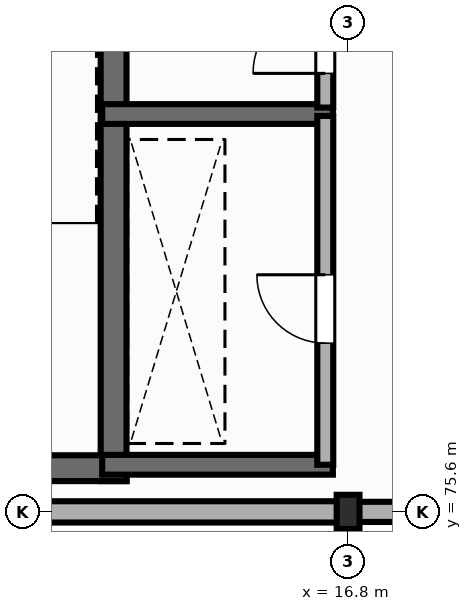
"""IFC4 building model, lengths in metres.
Left out: names, types, materials, properties, quantities, classifications, styles, units other than length and angle.
Written with IfcOpenShell. Run it as: python <this file> out.ifc"""

import sys

from ifc_helpers import new_model, si_unit, direction, frame, frame_2d, origin, origin_2d, place, context, subcontext, project, spatial, rectangle, i_section, extrude, element, fill, save


model = new_model("IFC4")
c1 = context("Model", 3, precision=1e-05, world=origin(), true_north=direction((0.0, 1.0)))
c2 = subcontext(c1, "Body", "Model", "MODEL_VIEW")
j1 = project(units=[si_unit("LENGTHUNIT", "METRE"), si_unit("PLANEANGLEUNIT", "RADIAN")], contexts=[c1])
p1 = place(None, origin())
s1 = spatial("IfcSite", under=j1, at=p1, CompositionType="ELEMENT")
p2 = place(p1, origin())
s2 = spatial("IfcBuilding", under=s1, at=p2, CompositionType="ELEMENT")
p3 = place(p2, frame((0.0, 0.0, 5.4)))
s3 = spatial("IfcBuildingStorey", under=s2, at=p3, CompositionType="ELEMENT", Elevation=5.4)
p4 = place(p3, frame((16.8, 75.6, 0.0), z_axis=(0.0, 0.0, 1.0), x_axis=(1.0, 0.0, 0.0)))
e1 = element("IfcColumn", 1, at=p4, inside=s3, PredefinedType="COLUMN", context=c2, shape_type="SweptSolid", body=[
    extrude(i_section(OverallWidth=0.3, OverallDepth=0.45, WebThickness=0.014, FlangeThickness=0.026, FilletRadius=0.027, at=origin_2d()), origin(), (0.0, 0.0, 1.0), 4.5),
])
p5 = place(p3, frame((8.408, 75.6, 0.0), z_axis=(0.0, 0.0, 1.0), x_axis=(1.0, 0.0, 0.0)))
e2 = element("IfcWall", 2, at=p5, inside=s3, PredefinedType="STANDARD", context=c2, shape_type="SweptSolid", body=[
    extrude(rectangle(XDim=8.384, YDim=0.28, at=frame_2d((4.192, 0.0))), origin(), (0.0, 0.0, 1.0), 3.922),
])
p6 = place(p3, frame((16.808, 75.6, 0.0), z_axis=(0.0, 0.0, 1.0), x_axis=(1.0, 0.0, 0.0)))
e3 = element("IfcWall", 3, at=p6, inside=s3, PredefinedType="STANDARD", context=c2, shape_type="SweptSolid", body=[
    extrude(rectangle(XDim=8.384, YDim=0.265, at=frame_2d((4.192, 0.0))), origin(), (0.0, 0.0, 1.0), 3.952),
])
p7 = place(p3, frame((13.715, 76.005, 0.0), z_axis=(0.0, 0.0, 1.0), x_axis=(0.0, 1.0, 0.0)))
e4 = element("IfcWall", 4, at=p7, inside=s3, PredefinedType="SHEAR", context=c2, shape_type="SweptSolid", body=[
    extrude(rectangle(XDim=9.99, YDim=0.34, at=frame_2d((4.995, 0.0))), origin(), (0.0, 0.0, 1.0), 4.29),
])
p8 = place(p3, frame((8.635, 76.175, 0.0), z_axis=(0.0, 0.0, 1.0), x_axis=(1.0, 0.0, 0.0)))
e5 = element("IfcWall", 5, at=p8, inside=s3, PredefinedType="SHEAR", context=c2, shape_type="SweptSolid", body=[
    extrude(rectangle(XDim=5.25, YDim=0.34, at=frame_2d((2.625, 0.0))), origin(), (0.0, 0.0, 1.0), 4.29),
])
for number, where, z_axis, x_axis in (
    (6, (13.565, 76.22, 0.0), (0.0, 0.0, 1.0), (1.0, 0.0, 0.0)),
    (7, (13.565, 80.835, 0.0), (0.0, 0.0, 1.0), (1.0, 0.0, 0.0)),
):
    element("IfcWall", number, at=place(p3, frame(where, z_axis=z_axis, x_axis=x_axis)), inside=s3, PredefinedType="SHEAR", context=c2, shape_type="SweptSolid", body=[
        extrude(rectangle(XDim=3.035, YDim=0.26, at=frame_2d((1.518, 0.0))), origin(), (0.0, 0.0, 1.0), 4.29),
    ])
p9 = place(p3, frame((16.5, 76.22, 0.0), z_axis=(0.0, 0.0, 1.0), x_axis=(0.0, 1.0, 0.0)))
e8 = element("IfcWall", 8, at=p9, inside=s3, PredefinedType="STANDARD", context=c2, shape_type="SweptSolid", body=[
    extrude(rectangle(XDim=4.59, YDim=0.21, at=frame_2d((2.295, 0.0))), origin(), (0.0, 0.0, 1.0), 3.972),
])
p10 = place(p9, frame((1.6, 0.0, 0.0)))
e9 = element("IfcOpeningElement", 9, at=p10, cuts=e8, PredefinedType="OPENING", context=c2, shape_type="SweptSolid", body=[
    extrude(rectangle(XDim=0.9, YDim=2.1, at=frame_2d((0.45, 1.05))), frame((0.0, 0.115, 0.0), z_axis=(0.0, -1.0, 0.0), x_axis=(1.0, 0.0, 0.0)), (0.0, 0.0, 1.0), 0.23),
])
p11 = place(p3, frame((16.5, 80.92, 0.0), z_axis=(0.0, 0.0, 1.0), x_axis=(0.0, 1.0, 0.0)))
e10 = element("IfcWall", 10, at=p11, inside=s3, PredefinedType="STANDARD", context=c2, shape_type="SweptSolid", body=[
    extrude(rectangle(XDim=4.48, YDim=0.21, at=frame_2d((2.24, 0.0))), origin(), (0.0, 0.0, 1.0), 3.682),
])
p12 = place(p11, frame((0.45, 0.0, 0.0)))
e11 = element("IfcOpeningElement", 11, at=p12, cuts=e10, PredefinedType="OPENING", context=c2, shape_type="SweptSolid", body=[
    extrude(rectangle(XDim=0.95, YDim=2.15, at=frame_2d((0.475, 1.075))), frame((0.0, 0.115, 0.0), z_axis=(0.0, -1.0, 0.0), x_axis=(1.0, 0.0, 0.0)), (0.0, 0.0, 1.0), 0.23),
])
p13 = place(p10, origin())
e12 = element("IfcDoor", 12, at=p13, inside=s3, OperationType="SINGLE_SWING_RIGHT", PredefinedType="DOOR", context=c2, shape_type="SweptSolid", body=[
    extrude(rectangle(XDim=0.9, YDim=2.1, at=frame_2d((0.45, 1.05))), frame((0.0, 0.025, 0.0), z_axis=(0.0, -1.0, 0.0), x_axis=(1.0, 0.0, 0.0)), (0.0, 0.0, 1.0), 0.05),
])
fill(e9, e12)
p14 = place(p12, origin())
e13 = element("IfcDoor", 13, at=p14, inside=s3, OperationType="SINGLE_SWING_LEFT", PredefinedType="DOOR", context=c2, shape_type="SweptSolid", body=[
    extrude(rectangle(XDim=0.95, YDim=2.15, at=frame_2d((0.475, 1.075))), frame((0.0, 0.025, 0.0), z_axis=(0.0, -1.0, 0.0), x_axis=(1.0, 0.0, 0.0)), (0.0, 0.0, 1.0), 0.05),
])
fill(e11, e13)
save(model, sys.argv[1])
